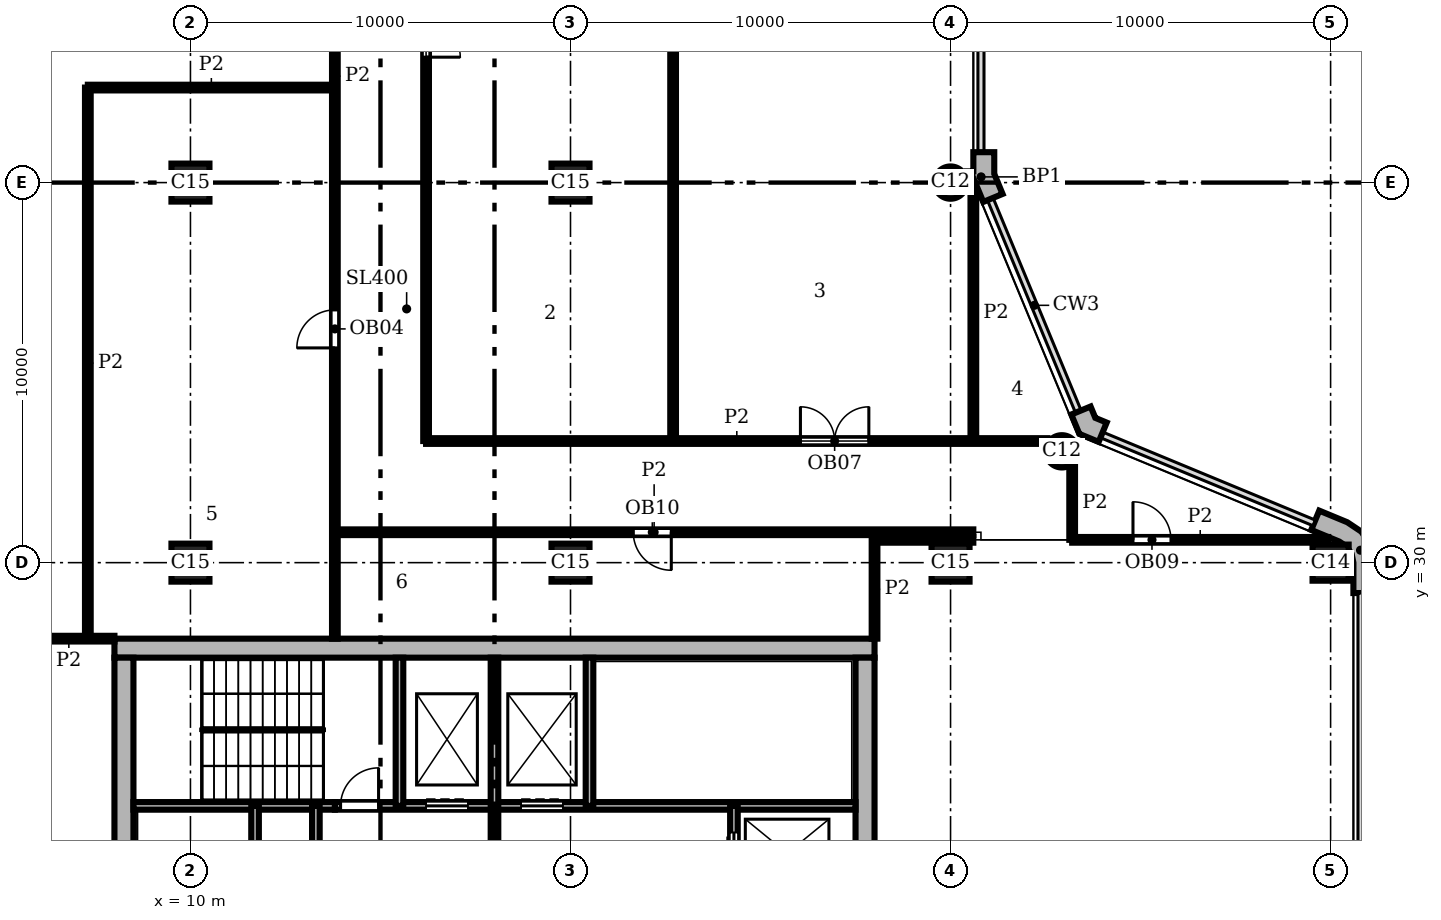
"""IFC4 building model, lengths in metres.
Left out: names, types, materials, properties, quantities, classifications, styles, units other than length and angle.
Written with IfcOpenShell. Run it as: python <this file> out.ifc"""

import sys

from ifc_helpers import new_model, si_unit, direction, frame, frame_2d, origin, origin_2d, place, context, subcontext, project, spatial, polyline, rectangle, circle, outline, extrude, element, fill, save


model = new_model("IFC4")
c1 = context("Model", 3, precision=1e-05, world=origin(), true_north=direction((0.0, 1.0)))
c2 = subcontext(c1, "Body", "Model", "MODEL_VIEW")
j1 = project(units=[si_unit("LENGTHUNIT", "METRE"), si_unit("PLANEANGLEUNIT", "RADIAN")], contexts=[c1])
p1 = place(None, origin())
s1 = spatial("IfcSite", under=j1, at=p1, CompositionType="ELEMENT")
p2 = place(p1, origin())
s2 = spatial("IfcBuilding", under=s1, at=p2, CompositionType="ELEMENT")
p3 = place(p2, frame((0.0, 0.0, 358.2)))
s3 = spatial("IfcBuildingStorey", under=s2, at=p3, CompositionType="ELEMENT", Elevation=358.2)
p4 = place(p3, frame((40.0, 30.0, 0.0), z_axis=(0.0, 0.0, 1.0), x_axis=(1.0, 0.0, 0.0)))
e1 = element("IfcColumn", 1, at=p4, inside=s3, PredefinedType="COLUMN", context=c2, shape_type="SweptSolid", body=[
    extrude(rectangle(XDim=0.95, YDim=0.95, at=origin_2d()), origin(), (0.0, 0.0, 1.0), 7.2),
])
for number, where, z_axis, x_axis in (
    (2, (32.929, 32.929, 0.0), (0.0, 0.0, 1.0), (1.0, 0.0, 0.0)),
    (3, (30.0, 40.0, 0.0), (0.0, 0.0, 1.0), (1.0, 0.0, 0.0)),
):
    element("IfcColumn", number, at=place(p3, frame(where, z_axis=z_axis, x_axis=x_axis)), inside=s3, PredefinedType="COLUMN", context=c2, shape_type="SweptSolid", body=[
        extrude(circle(Radius=0.425, at=origin_2d()), origin(), (0.0, 0.0, 1.0), 7.2),
    ])
for number, where, z_axis, x_axis in (
    (4, (10.0, 30.0, 0.0), (0.0, 0.0, 1.0), (1.0, 0.0, 0.0)),
    (5, (10.0, 40.0, 0.0), (0.0, 0.0, 1.0), (1.0, 0.0, 0.0)),
    (6, (20.0, 30.0, 0.0), (0.0, 0.0, 1.0), (1.0, 0.0, 0.0)),
    (7, (20.0, 40.0, 0.0), (0.0, 0.0, 1.0), (1.0, 0.0, 0.0)),
    (8, (30.0, 30.0, 0.0), (0.0, 0.0, 1.0), (1.0, 0.0, 0.0)),
):
    element("IfcColumn", number, at=place(p3, frame(where, z_axis=z_axis, x_axis=x_axis)), inside=s3, PredefinedType="COLUMN", context=c2, shape_type="SweptSolid", body=[
        extrude(rectangle(XDim=1.0, YDim=1.0, at=origin_2d()), origin(), (0.0, 0.0, 1.0), 7.2),
    ])
p5 = place(p3, frame((27.75, 8.5, 0.0), z_axis=(0.0, 0.0, 1.0), x_axis=(0.0, 1.0, 0.0)))
e9 = element("IfcWall", 9, at=p5, inside=s3, PredefinedType="SHEAR", context=c2, shape_type="SweptSolid", body=[
    extrude(rectangle(XDim=19.0, YDim=0.5, at=frame_2d((9.5, 0.0))), origin(), (0.0, 0.0, 1.0), 7.2),
])
p6 = place(p5, frame((4.95, 0.0, 0.0)))
e10 = element("IfcOpeningElement", 10, at=p6, cuts=e9, PredefinedType="OPENING", context=c2, shape_type="SweptSolid", body=[
    extrude(rectangle(XDim=1.6, YDim=2.1, at=frame_2d((0.8, 1.05))), frame((0.0, 0.26, 0.0), z_axis=(0.0, -1.0, 0.0), x_axis=(1.0, 0.0, 0.0)), (0.0, 0.0, 1.0), 0.52),
])
p7 = place(p3, frame((28.0, 27.75, 0.0), z_axis=(0.0, 0.0, 1.0), x_axis=(-1.0, 0.0, 0.0)))
e11 = element("IfcWall", 11, at=p7, inside=s3, PredefinedType="SHEAR", context=c2, shape_type="SweptSolid", body=[
    extrude(rectangle(XDim=20.0, YDim=0.5, at=frame_2d((10.0, 0.0))), origin(), (0.0, 0.0, 1.0), 7.2),
])
p8 = place(p3, frame((8.25, 27.5, 0.0), z_axis=(0.0, 0.0, 1.0), x_axis=(0.0, -1.0, 0.0)))
e12 = element("IfcWall", 12, at=p8, inside=s3, PredefinedType="SHEAR", context=c2, shape_type="SweptSolid", body=[
    extrude(rectangle(XDim=19.0, YDim=0.5, at=frame_2d((9.5, 0.0))), origin(), (0.0, 0.0, 1.0), 7.2),
])
p9 = place(p3, origin())
e13 = element("IfcWall", 13, at=p9, inside=s3, PredefinedType="SOLIDWALL", context=c2, shape_type="SweptSolid", body=[
    extrude(outline(polyline([(41.0, 29.2), (41.15, 29.2), (41.15, 30.0), (41.062, 30.44), (40.813, 30.813), (40.44, 31.062), (39.701, 31.369), (39.644, 31.23), (39.49, 30.861), (40.229, 30.554), (40.424, 30.424), (40.554, 30.229), (40.6, 30.0), (40.6, 29.2), (41.0, 29.2)])), origin(), (0.0, 0.0, 1.0), 7.2),
])
e14 = element("IfcWall", 14, at=p9, inside=s3, PredefinedType="SOLIDWALL", context=c2, shape_type="SweptSolid", body=[
    extrude(outline(polyline([(34.051, 33.547), (34.108, 33.685), (33.809, 33.809), (33.685, 34.108), (33.547, 34.051), (33.177, 33.898), (33.388, 33.388), (33.898, 33.177), (34.051, 33.547)])), origin(), (0.0, 0.0, 1.0), 7.2),
])
e15 = element("IfcWall", 15, at=p9, inside=s3, PredefinedType="SOLIDWALL", context=c2, shape_type="SweptSolid", body=[
    extrude(outline(polyline([(30.62, 39.995), (30.62, 40.071), (30.861, 39.49), (31.23, 39.644), (31.369, 39.701), (31.15, 40.229), (31.15, 40.8), (31.0, 40.8), (30.6, 40.8), (30.6, 40.295), (30.425, 40.295), (30.425, 39.995), (30.62, 39.995)])), origin(), (0.0, 0.0, 1.0), 7.2),
])
p10 = place(p3, frame((8.5, 23.6, 0.0), z_axis=(0.0, 0.0, 1.0), x_axis=(1.0, 0.0, 0.0)))
e16 = element("IfcWall", 16, at=p10, inside=s3, PredefinedType="SHEAR", context=c2, shape_type="SweptSolid", body=[
    extrude(rectangle(XDim=5.3, YDim=0.2, at=frame_2d((2.65, 0.0))), origin(), (0.0, 0.0, 1.0), 6.75),
])
p11 = place(p3, frame((13.8, 23.6, 0.0), z_axis=(0.0, 0.0, 1.0), x_axis=(1.0, 0.0, 0.0)))
e17 = element("IfcWall", 17, at=p11, inside=s3, PredefinedType="SHEAR", context=c2, shape_type="SweptSolid", body=[
    extrude(rectangle(XDim=13.7, YDim=0.2, at=frame_2d((6.85, 0.0))), origin(), (0.0, 0.0, 1.0), 6.75),
])
p12 = place(p11, frame((2.4, 0.0, 0.0)))
e18 = element("IfcOpeningElement", 18, at=p12, cuts=e17, PredefinedType="OPENING", context=c2, shape_type="SweptSolid", body=[
    extrude(rectangle(XDim=1.1, YDim=2.1, at=frame_2d((0.55, 1.05))), frame((0.0, 0.11, 0.0), z_axis=(0.0, -1.0, 0.0), x_axis=(1.0, 0.0, 0.0)), (0.0, 0.0, 1.0), 0.22),
])
p13 = place(p11, frame((4.9, 0.0, 0.0)))
e19 = element("IfcOpeningElement", 19, at=p13, cuts=e17, PredefinedType="OPENING", context=c2, shape_type="SweptSolid", body=[
    extrude(rectangle(XDim=1.1, YDim=2.1, at=frame_2d((0.55, 1.05))), frame((0.0, 0.11, 0.0), z_axis=(0.0, -1.0, 0.0), x_axis=(1.0, 0.0, 0.0)), (0.0, 0.0, 1.0), 0.22),
])
p14 = place(p11, frame((0.15, 0.0, 0.0)))
e20 = element("IfcOpeningElement", 20, at=p14, cuts=e17, PredefinedType="OPENING", context=c2, shape_type="SweptSolid", body=[
    extrude(rectangle(XDim=1.0, YDim=2.1, at=frame_2d((0.5, 1.05))), frame((0.0, 0.11, 0.0), z_axis=(0.0, -1.0, 0.0), x_axis=(1.0, 0.0, 0.0)), (0.0, 0.0, 1.0), 0.22),
])
p15 = place(p3, frame((11.7, 22.4, 0.0), z_axis=(0.0, 0.0, 1.0), x_axis=(0.0, 1.0, 0.0)))
e21 = element("IfcWall", 21, at=p15, inside=s3, PredefinedType="SHEAR", context=c2, shape_type="SweptSolid", body=[
    extrude(rectangle(XDim=1.2, YDim=0.2, at=frame_2d((0.6, 0.0))), origin(), (0.0, 0.0, 1.0), 6.75),
])
p16 = place(p3, frame((13.3, 20.0, 0.0), z_axis=(0.0, 0.0, 1.0), x_axis=(0.0, 1.0, 0.0)))
e22 = element("IfcWall", 22, at=p16, inside=s3, PredefinedType="SHEAR", context=c2, shape_type="SweptSolid", body=[
    extrude(rectangle(XDim=3.6, YDim=0.2, at=frame_2d((1.8, 0.0))), origin(), (0.0, 0.0, 1.0), 6.75),
])
p17 = place(p3, frame((15.5, 23.6, 0.0), z_axis=(0.0, 0.0, 1.0), x_axis=(0.0, 1.0, 0.0)))
e23 = element("IfcWall", 23, at=p17, inside=s3, PredefinedType="SHEAR", context=c2, shape_type="SweptSolid", body=[
    extrude(rectangle(XDim=3.9, YDim=0.2, at=frame_2d((1.95, 0.0))), origin(), (0.0, 0.0, 1.0), 6.75),
])
p18 = place(p3, frame((18.0, 20.0, 0.0), z_axis=(0.0, 0.0, 1.0), x_axis=(0.0, 1.0, 0.0)))
e24 = element("IfcWall", 24, at=p18, inside=s3, PredefinedType="SHEAR", context=c2, shape_type="SweptSolid", body=[
    extrude(rectangle(XDim=7.5, YDim=0.2, at=frame_2d((3.75, 0.0))), origin(), (0.0, 0.0, 1.0), 6.75),
])
p19 = place(p18, frame((1.2, 0.0, 0.0)))
e25 = element("IfcOpeningElement", 25, at=p19, cuts=e24, PredefinedType="OPENING", context=c2, shape_type="SweptSolid", body=[
    extrude(rectangle(XDim=1.2, YDim=2.1, at=frame_2d((0.6, 1.05))), frame((0.0, 0.11, 0.0), z_axis=(0.0, -1.0, 0.0), x_axis=(1.0, 0.0, 0.0)), (0.0, 0.0, 1.0), 0.22),
])
p20 = place(p3, frame((20.5, 23.6, 0.0), z_axis=(0.0, 0.0, 1.0), x_axis=(0.0, 1.0, 0.0)))
e26 = element("IfcWall", 26, at=p20, inside=s3, PredefinedType="SHEAR", context=c2, shape_type="SweptSolid", body=[
    extrude(rectangle(XDim=3.9, YDim=0.2, at=frame_2d((1.95, 0.0))), origin(), (0.0, 0.0, 1.0), 6.75),
])
p21 = place(p3, frame((24.3, 16.1, 0.0), z_axis=(0.0, 0.0, 1.0), x_axis=(0.0, 1.0, 0.0)))
e27 = element("IfcWall", 27, at=p21, inside=s3, PredefinedType="SHEAR", context=c2, shape_type="SweptSolid", body=[
    extrude(rectangle(XDim=7.5, YDim=0.2, at=frame_2d((3.75, 0.0))), origin(), (0.0, 0.0, 1.0), 6.75),
])
p22 = place(p21, frame((0.7, 0.0, 0.0)))
e28 = element("IfcOpeningElement", 28, at=p22, cuts=e27, PredefinedType="OPENING", context=c2, shape_type="SweptSolid", body=[
    extrude(rectangle(XDim=1.1, YDim=2.1, at=frame_2d((0.55, 1.05))), frame((0.0, 0.11, 0.0), z_axis=(0.0, -1.0, 0.0), x_axis=(1.0, 0.0, 0.0)), (0.0, 0.0, 1.0), 0.22),
])
p23 = place(p21, frame((3.2, 0.0, 0.0)))
e29 = element("IfcOpeningElement", 29, at=p23, cuts=e27, PredefinedType="OPENING", context=c2, shape_type="SweptSolid", body=[
    extrude(rectangle(XDim=1.1, YDim=2.1, at=frame_2d((0.55, 1.05))), frame((0.0, 0.11, 0.0), z_axis=(0.0, -1.0, 0.0), x_axis=(1.0, 0.0, 0.0)), (0.0, 0.0, 1.0), 0.22),
])
p24 = place(p21, frame((5.7, 0.0, 0.0)))
e30 = element("IfcOpeningElement", 30, at=p24, cuts=e27, PredefinedType="OPENING", context=c2, shape_type="SweptSolid", body=[
    extrude(rectangle(XDim=1.1, YDim=2.1, at=frame_2d((0.55, 1.05))), frame((0.0, 0.11, 0.0), z_axis=(0.0, -1.0, 0.0), x_axis=(1.0, 0.0, 0.0)), (0.0, 0.0, 1.0), 0.22),
])
p25 = place(p3, frame((7.3, 28.0, 0.0), z_axis=(0.0, 0.0, 1.0), x_axis=(0.0, 1.0, 0.0)))
e31 = element("IfcWall", 31, at=p25, inside=s3, PredefinedType="PARTITIONING", context=c2, shape_type="SweptSolid", body=[
    extrude(rectangle(XDim=14.5, YDim=0.15, at=frame_2d((7.25, 0.0))), origin(), (0.0, 0.0, 1.0), 6.75),
])
p26 = place(p3, frame((13.8, 28.0, 0.0), z_axis=(0.0, 0.0, 1.0), x_axis=(0.0, 1.0, 0.0)))
e32 = element("IfcWall", 32, at=p26, inside=s3, PredefinedType="PARTITIONING", context=c2, shape_type="SweptSolid", body=[
    extrude(rectangle(XDim=29.6, YDim=0.15, at=frame_2d((14.8, 0.0))), origin(), (0.0, 0.0, 1.0), 6.75),
])
p27 = place(p26, frame((7.65, 0.0, 0.0)))
e33 = element("IfcOpeningElement", 33, at=p27, cuts=e32, PredefinedType="OPENING", context=c2, shape_type="SweptSolid", body=[
    extrude(rectangle(XDim=1.0, YDim=2.1, at=frame_2d((0.5, 1.05))), frame((0.0, 0.085, 0.0), z_axis=(0.0, -1.0, 0.0), x_axis=(1.0, 0.0, 0.0)), (0.0, 0.0, 1.0), 0.17),
])
p28 = place(p26, frame((22.1, 0.0, 0.0)))
e34 = element("IfcOpeningElement", 34, at=p28, cuts=e32, PredefinedType="OPENING", context=c2, shape_type="SweptSolid", body=[
    extrude(rectangle(XDim=1.8, YDim=2.1, at=frame_2d((0.9, 1.05))), frame((0.0, 0.085, 0.0), z_axis=(0.0, -1.0, 0.0), x_axis=(1.0, 0.0, 0.0)), (0.0, 0.0, 1.0), 0.17),
])
p29 = place(p3, frame((16.2, 33.2, 0.0), z_axis=(0.0, 0.0, 1.0), x_axis=(0.0, 1.0, 0.0)))
e35 = element("IfcWall", 35, at=p29, inside=s3, PredefinedType="PARTITIONING", context=c2, shape_type="SweptSolid", body=[
    extrude(rectangle(XDim=24.4, YDim=0.15, at=frame_2d((12.2, 0.0))), origin(), (0.0, 0.0, 1.0), 6.75),
])
p30 = place(p29, frame((10.1, 0.0, 0.0)))
e36 = element("IfcOpeningElement", 36, at=p30, cuts=e35, PredefinedType="OPENING", context=c2, shape_type="SweptSolid", body=[
    extrude(rectangle(XDim=1.8, YDim=2.1, at=frame_2d((0.9, 1.05))), frame((0.0, 0.085, 0.0), z_axis=(0.0, -1.0, 0.0), x_axis=(1.0, 0.0, 0.0)), (0.0, 0.0, 1.0), 0.17),
])
p31 = place(p3, frame((22.7, 33.2, 0.0), z_axis=(0.0, 0.0, 1.0), x_axis=(0.0, 1.0, 0.0)))
e37 = element("IfcWall", 37, at=p31, inside=s3, PredefinedType="PARTITIONING", context=c2, shape_type="SweptSolid", body=[
    extrude(rectangle(XDim=24.4, YDim=0.15, at=frame_2d((12.2, 0.0))), origin(), (0.0, 0.0, 1.0), 6.75),
])
p32 = place(p3, frame((28.0, 28.0, 0.0), z_axis=(0.0, 0.0, 1.0), x_axis=(0.0, 1.0, 0.0)))
e38 = element("IfcWall", 38, at=p32, inside=s3, PredefinedType="PARTITIONING", context=c2, shape_type="SweptSolid", body=[
    extrude(rectangle(XDim=2.598, YDim=0.15, at=frame_2d((1.299, 0.0))), origin(), (0.0, 0.0, 1.0), 6.75),
])
p33 = place(p3, frame((30.6, 33.2, 0.0), z_axis=(0.0, 0.0, 1.0), x_axis=(0.0, 1.0, 0.0)))
e39 = element("IfcWall", 39, at=p33, inside=s3, PredefinedType="PARTITIONING", context=c2, shape_type="SweptSolid", body=[
    extrude(rectangle(XDim=6.738, YDim=0.15, at=frame_2d((3.369, 0.0))), origin(), (0.0, 0.0, 1.0), 6.75),
])
p34 = place(p3, frame((33.2, 30.6, 0.0), z_axis=(0.0, 0.0, 1.0), x_axis=(0.0, 1.0, 0.0)))
e40 = element("IfcWall", 40, at=p34, inside=s3, PredefinedType="PARTITIONING", context=c2, shape_type="SweptSolid", body=[
    extrude(rectangle(XDim=1.952, YDim=0.15, at=frame_2d((0.976, 0.0))), origin(), (0.0, 0.0, 1.0), 6.75),
])
p35 = place(p3, frame((5.6, 28.0, 0.0), z_axis=(0.0, 0.0, 1.0), x_axis=(1.0, 0.0, 0.0)))
e41 = element("IfcWall", 41, at=p35, inside=s3, PredefinedType="PARTITIONING", context=c2, shape_type="SweptSolid", body=[
    extrude(rectangle(XDim=2.4, YDim=0.15, at=frame_2d((1.2, 0.0))), origin(), (0.0, 0.0, 1.0), 6.75),
])
p36 = place(p3, frame((28.002, 30.6, 0.0), z_axis=(0.0, 0.0, 1.0), x_axis=(1.0, 0.0, 0.0)))
e42 = element("IfcWall", 42, at=p36, inside=s3, PredefinedType="PARTITIONING", context=c2, shape_type="SweptSolid", body=[
    extrude(rectangle(XDim=2.597, YDim=0.15, at=frame_2d((1.299, 0.0))), origin(), (0.0, 0.0, 1.0), 6.75),
])
p37 = place(p3, frame((33.2, 30.6, 0.0), z_axis=(0.0, 0.0, 1.0), x_axis=(1.0, 0.0, 0.0)))
e43 = element("IfcWall", 43, at=p37, inside=s3, PredefinedType="PARTITIONING", context=c2, shape_type="SweptSolid", body=[
    extrude(rectangle(XDim=6.738, YDim=0.15, at=frame_2d((3.369, 0.0))), origin(), (0.0, 0.0, 1.0), 6.75),
])
p38 = place(p37, frame((1.6, 0.0, 0.0)))
e44 = element("IfcOpeningElement", 44, at=p38, cuts=e43, PredefinedType="OPENING", context=c2, shape_type="SweptSolid", body=[
    extrude(rectangle(XDim=1.0, YDim=2.1, at=frame_2d((0.5, 1.05))), frame((0.0, 0.085, 0.0), z_axis=(0.0, -1.0, 0.0), x_axis=(1.0, 0.0, 0.0)), (0.0, 0.0, 1.0), 0.17),
])
p39 = place(p3, frame((13.802, 30.8, 0.0), z_axis=(0.0, 0.0, 1.0), x_axis=(1.0, 0.0, 0.0)))
e45 = element("IfcWall", 45, at=p39, inside=s3, PredefinedType="PARTITIONING", context=c2, shape_type="SweptSolid", body=[
    extrude(rectangle(XDim=16.797, YDim=0.15, at=frame_2d((8.398, 0.0))), origin(), (0.0, 0.0, 1.0), 6.75),
])
p40 = place(p39, frame((7.85, 0.0, 0.0)))
e46 = element("IfcOpeningElement", 46, at=p40, cuts=e45, PredefinedType="OPENING", context=c2, shape_type="SweptSolid", body=[
    extrude(rectangle(XDim=1.0, YDim=2.1, at=frame_2d((0.5, 1.05))), frame((0.0, 0.085, 0.0), z_axis=(0.0, -1.0, 0.0), x_axis=(1.0, 0.0, 0.0)), (0.0, 0.0, 1.0), 0.17),
])
p41 = place(p3, frame((16.2, 33.2, 0.0), z_axis=(0.0, 0.0, 1.0), x_axis=(1.0, 0.0, 0.0)))
e47 = element("IfcWall", 47, at=p41, inside=s3, PredefinedType="PARTITIONING", context=c2, shape_type="SweptSolid", body=[
    extrude(rectangle(XDim=16.352, YDim=0.15, at=frame_2d((8.176, 0.0))), origin(), (0.0, 0.0, 1.0), 6.75),
])
p42 = place(p41, frame((9.85, 0.0, 0.0)))
e48 = element("IfcOpeningElement", 48, at=p42, cuts=e47, PredefinedType="OPENING", context=c2, shape_type="SweptSolid", body=[
    extrude(rectangle(XDim=1.8, YDim=2.1, at=frame_2d((0.9, 1.05))), frame((0.0, 0.085, 0.0), z_axis=(0.0, -1.0, 0.0), x_axis=(1.0, 0.0, 0.0)), (0.0, 0.0, 1.0), 0.17),
])
p43 = place(p3, frame((7.3, 42.5, 0.0), z_axis=(0.0, 0.0, 1.0), x_axis=(1.0, 0.0, 0.0)))
e49 = element("IfcWall", 49, at=p43, inside=s3, PredefinedType="PARTITIONING", context=c2, shape_type="SweptSolid", body=[
    extrude(rectangle(XDim=6.5, YDim=0.15, at=frame_2d((3.25, 0.0))), origin(), (0.0, 0.0, 1.0), 6.75),
])
p44 = place(p24, origin())
e50 = element("IfcDoor", 50, at=p44, inside=s3, OperationType="DOUBLE_DOOR_SLIDING", PredefinedType="DOOR", context=c2, shape_type="SweptSolid", body=[
    extrude(rectangle(XDim=1.1, YDim=2.1, at=frame_2d((0.55, 1.05))), frame((0.0, 0.025, 0.0), z_axis=(0.0, -1.0, 0.0), x_axis=(1.0, 0.0, 0.0)), (0.0, 0.0, 1.0), 0.05),
])
fill(e30, e50)
p45 = place(p12, origin())
e51 = element("IfcDoor", 51, at=p45, inside=s3, OperationType="DOUBLE_DOOR_SLIDING", PredefinedType="DOOR", context=c2, shape_type="SweptSolid", body=[
    extrude(rectangle(XDim=1.1, YDim=2.1, at=frame_2d((0.55, 1.05))), frame((0.0, 0.025, 0.0), z_axis=(0.0, -1.0, 0.0), x_axis=(1.0, 0.0, 0.0)), (0.0, 0.0, 1.0), 0.05),
])
fill(e18, e51)
p46 = place(p13, origin())
e52 = element("IfcDoor", 52, at=p46, inside=s3, OperationType="DOUBLE_DOOR_SLIDING", PredefinedType="DOOR", context=c2, shape_type="SweptSolid", body=[
    extrude(rectangle(XDim=1.1, YDim=2.1, at=frame_2d((0.55, 1.05))), frame((0.0, 0.025, 0.0), z_axis=(0.0, -1.0, 0.0), x_axis=(1.0, 0.0, 0.0)), (0.0, 0.0, 1.0), 0.05),
])
fill(e19, e52)
p47 = place(p14, origin())
e53 = element("IfcDoor", 53, at=p47, inside=s3, OperationType="SINGLE_SWING_RIGHT", PredefinedType="DOOR", context=c2, shape_type="SweptSolid", body=[
    extrude(rectangle(XDim=1.0, YDim=2.1, at=frame_2d((0.5, 1.05))), frame((0.0, 0.025, 0.0), z_axis=(0.0, -1.0, 0.0), x_axis=(1.0, 0.0, 0.0)), (0.0, 0.0, 1.0), 0.05),
])
fill(e20, e53)
p48 = place(p27, origin())
e54 = element("IfcDoor", 54, at=p48, inside=s3, OperationType="SINGLE_SWING_LEFT", PredefinedType="DOOR", context=c2, shape_type="SweptSolid", body=[
    extrude(rectangle(XDim=1.0, YDim=2.1, at=frame_2d((0.5, 1.05))), frame((0.0, 0.025, 0.0), z_axis=(0.0, -1.0, 0.0), x_axis=(1.0, 0.0, 0.0)), (0.0, 0.0, 1.0), 0.05),
])
fill(e33, e54)
p49 = place(p30, frame((1.8, 0.0, 0.0), z_axis=(0.0, 0.0, 1.0), x_axis=(-1.0, 0.0, 0.0)))
e55 = element("IfcDoor", 55, at=p49, inside=s3, OperationType="DOUBLE_DOOR_SINGLE_SWING", PredefinedType="DOOR", context=c2, shape_type="SweptSolid", body=[
    extrude(rectangle(XDim=1.8, YDim=2.1, at=frame_2d((0.9, 1.05))), frame((0.0, 0.025, 0.0), z_axis=(0.0, -1.0, 0.0), x_axis=(1.0, 0.0, 0.0)), (0.0, 0.0, 1.0), 0.05),
])
fill(e36, e55)
p50 = place(p42, origin())
e56 = element("IfcDoor", 56, at=p50, inside=s3, OperationType="DOUBLE_DOOR_SINGLE_SWING", PredefinedType="DOOR", context=c2, shape_type="SweptSolid", body=[
    extrude(rectangle(XDim=1.8, YDim=2.1, at=frame_2d((0.9, 1.05))), frame((0.0, 0.025, 0.0), z_axis=(0.0, -1.0, 0.0), x_axis=(1.0, 0.0, 0.0)), (0.0, 0.0, 1.0), 0.05),
])
fill(e48, e56)
p51 = place(p38, origin())
e57 = element("IfcDoor", 57, at=p51, inside=s3, OperationType="SINGLE_SWING_LEFT", PredefinedType="DOOR", context=c2, shape_type="SweptSolid", body=[
    extrude(rectangle(XDim=1.0, YDim=2.1, at=frame_2d((0.5, 1.05))), frame((0.0, 0.025, 0.0), z_axis=(0.0, -1.0, 0.0), x_axis=(1.0, 0.0, 0.0)), (0.0, 0.0, 1.0), 0.05),
])
fill(e44, e57)
p52 = place(p40, frame((1.0, 0.0, 0.0), z_axis=(0.0, 0.0, 1.0), x_axis=(-1.0, 0.0, 0.0)))
e58 = element("IfcDoor", 58, at=p52, inside=s3, OperationType="SINGLE_SWING_LEFT", PredefinedType="DOOR", context=c2, shape_type="SweptSolid", body=[
    extrude(rectangle(XDim=1.0, YDim=2.1, at=frame_2d((0.5, 1.05))), frame((0.0, 0.025, 0.0), z_axis=(0.0, -1.0, 0.0), x_axis=(1.0, 0.0, 0.0)), (0.0, 0.0, 1.0), 0.05),
])
fill(e46, e58)
save(model, sys.argv[1])
